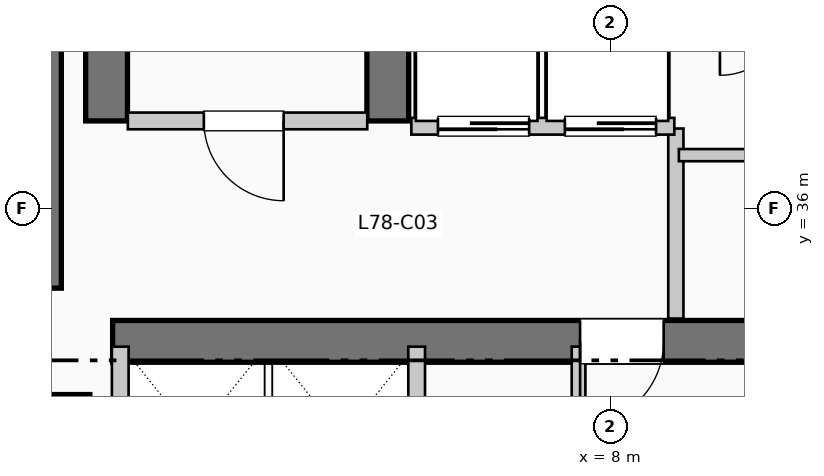
"""IFC4 building model, lengths in metres.
Left out: names, types, materials, properties, quantities, classifications, styles, units other than length and angle.
Written with IfcOpenShell. Run it as: python <this file> out.ifc"""

import sys

from ifc_helpers import new_model, si_unit, direction, frame, frame_2d, origin, origin_2d, place, context, subcontext, project, spatial, rectangle, extrude, element, fill, save


model = new_model("IFC4")
c1 = context("Model", 3, precision=1e-05, world=origin(), true_north=direction((0.0, 1.0)))
c2 = subcontext(c1, "Body", "Model", "MODEL_VIEW")
j1 = project(units=[si_unit("LENGTHUNIT", "METRE"), si_unit("PLANEANGLEUNIT", "RADIAN")], contexts=[c1])
p1 = place(None, origin())
s1 = spatial("IfcSite", under=j1, at=p1, CompositionType="ELEMENT")
p2 = place(p1, origin())
s2 = spatial("IfcBuilding", under=s1, at=p2, CompositionType="ELEMENT")
p3 = place(p2, frame((0.0, 0.0, 319.77)))
s3 = spatial("IfcBuildingStorey", under=s2, at=p3, CompositionType="ELEMENT", Elevation=319.77)
p4 = place(p3, frame((0.5, 34.95, 0.0), z_axis=(0.0, 0.0, 1.0), x_axis=(0.0, 1.0, 0.0)))
e1 = element("IfcWall", 1, at=p4, inside=s3, PredefinedType="SHEAR", context=c2, shape_type="SweptSolid", body=[
    extrude(rectangle(XDim=7.9, YDim=0.55, at=frame_2d((3.95, 0.0))), origin(), (0.0, 0.0, 1.0), 3.96),
])
p5 = place(p3, frame((1.45, 34.25, 0.0), z_axis=(0.0, 0.0, 1.0), x_axis=(1.0, 0.0, 0.0)))
e2 = element("IfcWall", 2, at=p5, inside=s3, PredefinedType="SHEAR", context=c2, shape_type="SweptSolid", body=[
    extrude(rectangle(XDim=10.71, YDim=0.55, at=frame_2d((5.355, 0.0))), origin(), (0.0, 0.0, 1.0), 3.96),
])
p6 = place(p5, frame((7.25, 0.0, 0.0), z_axis=(0.0, 0.0, 1.0), x_axis=(-1.0, 0.0, 0.0)))
e3 = element("IfcOpeningElement", 3, at=p6, cuts=e2, PredefinedType="OPENING", context=c2, shape_type="SweptSolid", body=[
    extrude(rectangle(XDim=1.1, YDim=2.15, at=frame_2d((0.55, 1.075))), frame((0.0, 0.285, 0.0), z_axis=(0.0, -1.0, 0.0), x_axis=(1.0, 0.0, 0.0)), (0.0, 0.0, 1.0), 0.57),
])
for number, where, z_axis, x_axis in (
    (4, (1.37, 37.15, 0.0), (0.0, 0.0, 1.0), (0.0, 1.0, 0.0)),
    (5, (5.07, 37.15, 0.0), (0.0, 0.0, 1.0), (0.0, 1.0, 0.0)),
):
    element("IfcWall", number, at=place(p3, frame(where, z_axis=z_axis, x_axis=x_axis)), inside=s3, PredefinedType="SHEAR", context=c2, shape_type="SweptSolid", body=[
        extrude(rectangle(XDim=7.89, YDim=0.55, at=frame_2d((3.945, 0.0))), origin(), (0.0, 0.0, 1.0), 3.96),
    ])
p7 = place(p3, frame((0.8, 33.2, 0.0), z_axis=(0.0, 0.0, 1.0), x_axis=(1.0, 0.0, 0.0)))
e6 = element("IfcColumn", 6, at=p7, inside=s3, PredefinedType="COLUMN", context=c2, shape_type="SweptSolid", body=[
    extrude(rectangle(XDim=0.7, YDim=0.7, at=origin_2d()), origin(), (0.0, 0.0, 1.0), 3.96),
])
p8 = place(p3, frame((1.65, 37.15, 0.0), z_axis=(0.0, 0.0, 1.0), x_axis=(1.0, 0.0, 0.0)))
e7 = element("IfcWall", 7, at=p8, inside=s3, PredefinedType="PARTITIONING", context=c2, shape_type="SweptSolid", body=[
    extrude(rectangle(XDim=3.15, YDim=0.22, at=frame_2d((1.575, 0.0))), origin(), (0.0, 0.0, 1.0), 3.74),
])
p9 = place(p8, frame((2.05, 0.0, 0.0), z_axis=(0.0, 0.0, 1.0), x_axis=(-1.0, 0.0, 0.0)))
e8 = element("IfcOpeningElement", 8, at=p9, cuts=e7, PredefinedType="OPENING", context=c2, shape_type="SweptSolid", body=[
    extrude(rectangle(XDim=1.05, YDim=2.15, at=frame_2d((0.525, 1.075))), frame((0.0, 0.12, 0.0), z_axis=(0.0, -1.0, 0.0), x_axis=(1.0, 0.0, 0.0)), (0.0, 0.0, 1.0), 0.24),
])
p10 = place(p3, frame((8.86, 34.55, 0.0), z_axis=(0.0, 0.0, 1.0), x_axis=(0.0, 1.0, 0.0)))
e9 = element("IfcWall", 9, at=p10, inside=s3, PredefinedType="PARTITIONING", context=c2, shape_type="SweptSolid", body=[
    extrude(rectangle(XDim=2.5, YDim=0.2, at=frame_2d((1.25, 0.0))), origin(), (0.0, 0.0, 1.0), 3.74),
])
p11 = place(p3, frame((5.38, 37.08, 0.0), z_axis=(0.0, 0.0, 1.0), x_axis=(1.0, 0.0, 0.0)))
e10 = element("IfcWall", 10, at=p11, inside=s3, PredefinedType="PARTITIONING", context=c2, shape_type="SweptSolid", body=[
    extrude(rectangle(XDim=3.46, YDim=0.22, at=frame_2d((1.73, 0.0))), origin(), (0.0, 0.0, 1.0), 3.74),
])
p12 = place(p11, frame((1.55, 0.0, 0.0), z_axis=(0.0, 0.0, 1.0), x_axis=(-1.0, 0.0, 0.0)))
e11 = element("IfcOpeningElement", 11, at=p12, cuts=e10, PredefinedType="OPENING", context=c2, shape_type="SweptSolid", body=[
    extrude(rectangle(XDim=1.2, YDim=2.2, at=frame_2d((0.6, 1.1))), frame((0.0, 0.12, 0.0), z_axis=(0.0, -1.0, 0.0), x_axis=(1.0, 0.0, 0.0)), (0.0, 0.0, 1.0), 0.24),
])
p13 = place(p11, frame((3.22, 0.0, 0.0), z_axis=(0.0, 0.0, 1.0), x_axis=(-1.0, 0.0, 0.0)))
e12 = element("IfcOpeningElement", 12, at=p13, cuts=e10, PredefinedType="OPENING", context=c2, shape_type="SweptSolid", body=[
    extrude(rectangle(XDim=1.2, YDim=2.2, at=frame_2d((0.6, 1.1))), frame((0.0, 0.12, 0.0), z_axis=(0.0, -1.0, 0.0), x_axis=(1.0, 0.0, 0.0)), (0.0, 0.0, 1.0), 0.24),
])
for number, where, z_axis, x_axis in (
    (13, (1.55, 31.8, 0.0), (0.0, 0.0, 1.0), (0.0, 1.0, 0.0)),
    (14, (5.45, 31.8, 0.0), (0.0, 0.0, 1.0), (0.0, 1.0, 0.0)),
):
    element("IfcWall", number, at=place(p3, frame(where, z_axis=z_axis, x_axis=x_axis)), inside=s3, PredefinedType="PARTITIONING", context=c2, shape_type="SweptSolid", body=[
        extrude(rectangle(XDim=2.38, YDim=0.22, at=frame_2d((1.19, 0.0))), origin(), (0.0, 0.0, 1.0), 3.74),
    ])
p14 = place(p3, frame((7.58, 31.82, 0.0), z_axis=(0.0, 0.0, 1.0), x_axis=(0.0, 1.0, 0.0)))
e15 = element("IfcWall", 15, at=p14, inside=s3, PredefinedType="PLUMBINGWALL", context=c2, shape_type="SweptSolid", body=[
    extrude(rectangle(XDim=2.36, YDim=0.18, at=frame_2d((1.18, 0.0))), origin(), (0.0, 0.0, 1.0), 3.74),
])
p15 = place(p3, frame((8.9, 36.7, 0.0), z_axis=(0.0, 0.0, 1.0), x_axis=(1.0, 0.0, 0.0)))
e16 = element("IfcWall", 16, at=p15, inside=s3, PredefinedType="PARTITIONING", context=c2, shape_type="SweptSolid", body=[
    extrude(rectangle(XDim=3.25, YDim=0.16, at=frame_2d((1.625, 0.0))), origin(), (0.0, 0.0, 1.0), 3.74),
])
p16 = place(p15, frame((1.1, 0.0, 0.0)))
e17 = element("IfcOpeningElement", 17, at=p16, cuts=e16, PredefinedType="OPENING", context=c2, shape_type="SweptSolid", body=[
    extrude(rectangle(XDim=0.95, YDim=2.15, at=frame_2d((0.475, 1.075))), frame((0.0, 0.09, 0.0), z_axis=(0.0, -1.0, 0.0), x_axis=(1.0, 0.0, 0.0)), (0.0, 0.0, 1.0), 0.18),
])
p17 = place(p9, origin())
e18 = element("IfcDoor", 18, at=p17, inside=s3, OperationType="SINGLE_SWING_RIGHT", PredefinedType="DOOR", context=c2, shape_type="SweptSolid", body=[
    extrude(rectangle(XDim=1.05, YDim=2.15, at=frame_2d((0.525, 1.075))), frame((0.0, 0.025, 0.0), z_axis=(0.0, -1.0, 0.0), x_axis=(1.0, 0.0, 0.0)), (0.0, 0.0, 1.0), 0.05),
])
fill(e8, e18)
p18 = place(p6, origin())
e19 = element("IfcDoor", 19, at=p18, inside=s3, OperationType="SINGLE_SWING_LEFT", PredefinedType="DOOR", context=c2, shape_type="SweptSolid", body=[
    extrude(rectangle(XDim=1.1, YDim=2.15, at=frame_2d((0.55, 1.075))), frame((0.0, 0.025, 0.0), z_axis=(0.0, -1.0, 0.0), x_axis=(1.0, 0.0, 0.0)), (0.0, 0.0, 1.0), 0.05),
])
fill(e3, e19)
p19 = place(p12, origin())
e20 = element("IfcDoor", 20, at=p19, inside=s3, OperationType="SLIDING_TO_RIGHT", PredefinedType="DOOR", context=c2, shape_type="SweptSolid", body=[
    extrude(rectangle(XDim=1.2, YDim=2.2, at=frame_2d((0.6, 1.1))), frame((0.0, 0.025, 0.0), z_axis=(0.0, -1.0, 0.0), x_axis=(1.0, 0.0, 0.0)), (0.0, 0.0, 1.0), 0.05),
])
fill(e11, e20)
p20 = place(p13, origin())
e21 = element("IfcDoor", 21, at=p20, inside=s3, OperationType="SLIDING_TO_RIGHT", PredefinedType="DOOR", context=c2, shape_type="SweptSolid", body=[
    extrude(rectangle(XDim=1.2, YDim=2.2, at=frame_2d((0.6, 1.1))), frame((0.0, 0.025, 0.0), z_axis=(0.0, -1.0, 0.0), x_axis=(1.0, 0.0, 0.0)), (0.0, 0.0, 1.0), 0.05),
])
fill(e12, e21)
save(model, sys.argv[1])
